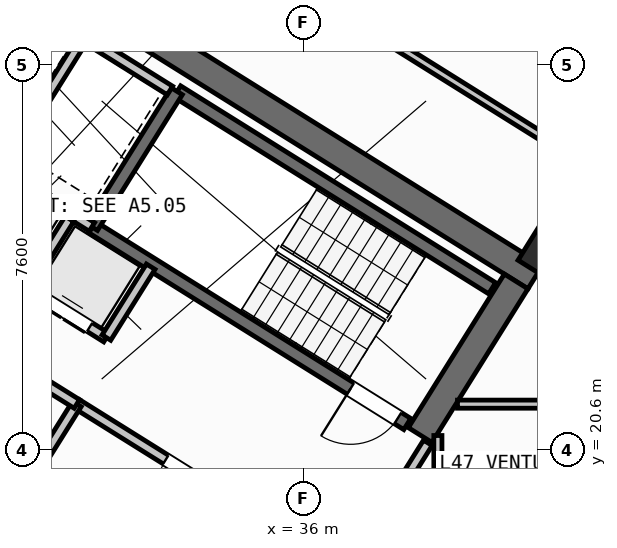
"""IFC4 building model, lengths in metres.
Left out: names, types, materials, properties, quantities, classifications, styles, units other than length and angle.
Written with IfcOpenShell. Run it as: python <this file> out.ifc"""

import sys

from ifc_helpers import new_model, si_unit, direction, frame, frame_2d, origin, origin_2d, place, context, subcontext, project, spatial, rectangle, hollow_rectangle, extrude, source, transform, mapped, element, fill, save


model = new_model("IFC4")
c1 = context("Model", 3, precision=1e-05, world=origin(), true_north=direction((0.0, 1.0)))
c2 = subcontext(c1, "Body", "Model", "MODEL_VIEW")
j1 = project(units=[si_unit("LENGTHUNIT", "METRE"), si_unit("PLANEANGLEUNIT", "RADIAN")], contexts=[c1])
p1 = place(None, origin())
s1 = spatial("IfcSite", under=j1, at=p1, CompositionType="ELEMENT")
p2 = place(p1, origin())
s2 = spatial("IfcBuilding", under=s1, at=p2, CompositionType="ELEMENT")
p3 = place(p2, frame((0.0, 0.0, 187.8)))
s3 = spatial("IfcBuildingStorey", under=s2, at=p3, CompositionType="ELEMENT", Elevation=187.8)
p4 = place(p3, frame((40.573, 24.01, 0.0), z_axis=(0.0, 0.0, 1.0), x_axis=(-0.848047359947, 0.529920442413, 0.0)))
e1 = element("IfcWall", 1, at=p4, inside=s3, PredefinedType="SHEAR", context=c2, shape_type="SweptSolid", body=[
    extrude(rectangle(XDim=13.14, YDim=0.55, at=frame_2d((6.57, 0.0))), origin(), (0.0, 0.0, 1.0), 3.35),
])
p5 = place(p3, frame((40.194, 23.922, 0.0), z_axis=(0.0, 0.0, 1.0), x_axis=(-0.529888438328, -0.848067357541, 0.0)))
e2 = element("IfcWall", 2, at=p5, inside=s3, PredefinedType="SHEAR", context=c2, shape_type="SweptSolid", body=[
    extrude(rectangle(XDim=3.575, YDim=0.55, at=frame_2d((1.788, 0.0))), origin(), (0.0, 0.0, 1.0), 3.35),
])
m1 = source(origin(), c2, "Body", "SweptSolid", [
    extrude(hollow_rectangle(XDim=0.8, YDim=0.8, WallThickness=0.032, at=origin_2d()), origin(), (0.0, 0.0, 1.0), 3.6),
])
p6 = place(p3, frame((40.783, 24.469, 0.0), z_axis=(0.0, 0.0, 1.0), x_axis=(-0.848048096156, 0.529919264233, 0.0)))
e3 = element("IfcColumn", 3, at=p6, inside=s3, PredefinedType="COLUMN", context=c2, shape_type="MappedRepresentation", body=[
    mapped(m1, transform((0.0, 0.0, 0.0), scale=1.0)),
])
p7 = place(p3, frame((31.76, 12.183, 0.0), z_axis=(0.0, 0.0, 1.0), x_axis=(-0.848047074256, 0.529920899612, 0.0)))
e4 = element("IfcWall", 4, at=p7, inside=s3, PredefinedType="STANDARD", context=c2, shape_type="SweptSolid", body=[
    extrude(rectangle(XDim=30.652, YDim=0.32, at=frame_2d((15.326, 0.0))), origin(), (0.0, 0.0, 1.0), 3.35),
])
p8 = place(p7, frame((15.166, 0.0, 0.0)))
e5 = element("IfcOpeningElement", 5, at=p8, cuts=e4, PredefinedType="OPENING", context=c2, shape_type="SweptSolid", body=[
    extrude(rectangle(XDim=1.2, YDim=2.15, at=frame_2d((0.6, 1.075))), frame((0.0, 0.17, 0.0), z_axis=(0.0, -1.0, 0.0), x_axis=(1.0, 0.0, 0.0)), (0.0, 0.0, 1.0), 0.34),
])
p9 = place(p7, frame((2.015, 0.0, 0.8)))
e6 = element("IfcOpeningElement", 6, at=p9, cuts=e4, PredefinedType="OPENING", context=c2, shape_type="SweptSolid", body=[
    extrude(rectangle(XDim=2.1, YDim=1.55, at=frame_2d((1.05, 0.775))), frame((0.0, 0.17, 0.0), z_axis=(0.0, -1.0, 0.0), x_axis=(1.0, 0.0, 0.0)), (0.0, 0.0, 1.0), 0.34),
])
p10 = place(p7, frame((7.244, 0.0, 0.8)))
e7 = element("IfcOpeningElement", 7, at=p10, cuts=e4, PredefinedType="OPENING", context=c2, shape_type="SweptSolid", body=[
    extrude(rectangle(XDim=2.1, YDim=1.55, at=frame_2d((1.05, 0.775))), frame((0.0, 0.17, 0.0), z_axis=(0.0, -1.0, 0.0), x_axis=(1.0, 0.0, 0.0)), (0.0, 0.0, 1.0), 0.34),
])
p11 = place(p7, frame((12.623, 0.0, 1.0)))
e8 = element("IfcOpeningElement", 8, at=p11, cuts=e4, PredefinedType="OPENING", context=c2, shape_type="SweptSolid", body=[
    extrude(rectangle(XDim=0.9, YDim=1.25, at=frame_2d((0.45, 0.625))), frame((0.0, 0.17, 0.0), z_axis=(0.0, -1.0, 0.0), x_axis=(1.0, 0.0, 0.0)), (0.0, 0.0, 1.0), 0.34),
])
p12 = place(p7, frame((19.565, 0.0, 0.95)))
e9 = element("IfcOpeningElement", 9, at=p12, cuts=e4, PredefinedType="OPENING", context=c2, shape_type="SweptSolid", body=[
    extrude(rectangle(XDim=1.2, YDim=1.4, at=frame_2d((0.6, 0.7))), frame((0.0, 0.17, 0.0), z_axis=(0.0, -1.0, 0.0), x_axis=(1.0, 0.0, 0.0)), (0.0, 0.0, 1.0), 0.34),
])
p13 = place(p7, frame((25.983, 0.0, 1.0)))
e10 = element("IfcOpeningElement", 10, at=p13, cuts=e4, PredefinedType="OPENING", context=c2, shape_type="SweptSolid", body=[
    extrude(rectangle(XDim=0.9, YDim=1.25, at=frame_2d((0.45, 0.625))), frame((0.0, 0.17, 0.0), z_axis=(0.0, -1.0, 0.0), x_axis=(1.0, 0.0, 0.0)), (0.0, 0.0, 1.0), 0.34),
])
p14 = place(p7, frame((28.433, 0.0, 1.0)))
e11 = element("IfcOpeningElement", 11, at=p14, cuts=e4, PredefinedType="OPENING", context=c2, shape_type="SweptSolid", body=[
    extrude(rectangle(XDim=0.9, YDim=1.25, at=frame_2d((0.45, 0.625))), frame((0.0, 0.17, 0.0), z_axis=(0.0, -1.0, 0.0), x_axis=(1.0, 0.0, 0.0)), (0.0, 0.0, 1.0), 0.34),
])
p15 = place(p3, frame((31.28, 18.261, 0.0), z_axis=(0.0, 0.0, 1.0), x_axis=(-0.848051618787, 0.529913626805, 0.0)))
e12 = element("IfcWall", 12, at=p15, inside=s3, PredefinedType="SHEAR", context=c2, shape_type="SweptSolid", body=[
    extrude(rectangle(XDim=7.46, YDim=0.26, at=frame_2d((3.73, 0.0))), origin(), (0.0, 0.0, 1.0), 3.35),
])
p16 = place(p15, frame((0.36, 0.0, 0.0)))
e13 = element("IfcOpeningElement", 13, at=p16, cuts=e12, PredefinedType="OPENING", context=c2, shape_type="SweptSolid", body=[
    extrude(rectangle(XDim=0.86, YDim=2.05, at=frame_2d((0.43, 1.025))), frame((0.0, 0.14, 0.0), z_axis=(0.0, -1.0, 0.0), x_axis=(1.0, 0.0, 0.0)), (0.0, 0.0, 1.0), 0.28),
])
p17 = place(p3, frame((39.721, 23.788, 0.0), z_axis=(0.0, 0.0, 1.0), x_axis=(-0.848054434086, 0.529909121291, 0.0)))
e14 = element("IfcWall", 14, at=p17, inside=s3, PredefinedType="SHEAR", context=c2, shape_type="SweptSolid", body=[
    extrude(rectangle(XDim=7.33, YDim=0.26, at=frame_2d((3.665, 0.0))), origin(), (0.0, 0.0, 1.0), 3.35),
])
p18 = place(p3, frame((38.046, 21.108, 0.0), z_axis=(0.0, 0.0, 1.0), x_axis=(-0.848054434086, 0.529909121291, 0.0)))
e15 = element("IfcWall", 15, at=p18, inside=s3, PredefinedType="SHEAR", context=c2, shape_type="SweptSolid", body=[
    extrude(rectangle(XDim=7.33, YDim=0.26, at=frame_2d((3.665, 0.0))), origin(), (0.0, 0.0, 1.0), 3.35),
])
p19 = place(p18, frame((0.22, 0.0, 0.0)))
e16 = element("IfcOpeningElement", 16, at=p19, cuts=e15, PredefinedType="OPENING", context=c2, shape_type="SweptSolid", body=[
    extrude(rectangle(XDim=1.1, YDim=2.1, at=frame_2d((0.55, 1.05))), frame((0.0, 0.14, 0.0), z_axis=(0.0, -1.0, 0.0), x_axis=(1.0, 0.0, 0.0)), (0.0, 0.0, 1.0), 0.28),
])
p20 = place(p3, frame((33.496, 27.677, 0.0), z_axis=(0.0, 0.0, 1.0), x_axis=(-0.529908658664, -0.84805472316, 0.0)))
e17 = element("IfcWall", 17, at=p20, inside=s3, PredefinedType="SHEAR", context=c2, shape_type="SweptSolid", body=[
    extrude(rectangle(XDim=3.16, YDim=0.26, at=frame_2d((1.58, 0.0))), origin(), (0.0, 0.0, 1.0), 3.35),
])
p21 = place(p3, frame((36.417, 18.447, 0.0), z_axis=(0.0, 0.0, 1.0), x_axis=(-0.848064879198, 0.529892404805, 0.0)))
e18 = element("IfcWall", 18, at=p21, inside=s3, PredefinedType="STANDARD", context=c2, shape_type="SweptSolid", body=[
    extrude(rectangle(XDim=5.768, YDim=0.2, at=frame_2d((2.884, 0.0))), origin(), (0.0, 0.0, 1.0), 3.34),
])
p22 = place(p21, frame((2.548, 0.0, 0.0)))
e19 = element("IfcOpeningElement", 19, at=p22, cuts=e18, PredefinedType="OPENING", context=c2, shape_type="SweptSolid", body=[
    extrude(rectangle(XDim=1.15, YDim=2.1, at=frame_2d((0.575, 1.05))), frame((0.0, 0.11, 0.0), z_axis=(0.0, -1.0, 0.0), x_axis=(1.0, 0.0, 0.0)), (0.0, 0.0, 1.0), 0.22),
])
p23 = place(p3, frame((31.822, 24.998, 0.0), z_axis=(0.0, 0.0, 1.0), x_axis=(-0.848036912365, 0.52993716162, 0.0)))
e20 = element("IfcWall", 20, at=p23, inside=s3, PredefinedType="STANDARD", context=c2, shape_type="SweptSolid", body=[
    extrude(rectangle(XDim=4.618, YDim=0.2, at=frame_2d((2.309, 0.0))), origin(), (0.0, 0.0, 1.0), 3.34),
])
p24 = place(p3, frame((32.108, 22.814, 0.0), z_axis=(0.0, 0.0, 1.0), x_axis=(-0.848042229521, 0.529928652696, 0.0)))
e21 = element("IfcWall", 21, at=p24, inside=s3, PredefinedType="STANDARD", context=c2, shape_type="SweptSolid", body=[
    extrude(rectangle(XDim=5.62, YDim=0.2, at=frame_2d((2.81, 0.0))), origin(), (0.0, 0.0, 1.0), 3.34),
])
p25 = place(p24, frame((0.39, 0.0, 0.0)))
e22 = element("IfcOpeningElement", 22, at=p25, cuts=e21, PredefinedType="OPENING", context=c2, shape_type="SweptSolid", body=[
    extrude(rectangle(XDim=1.1, YDim=2.15, at=frame_2d((0.55, 1.075))), frame((0.0, 0.11, 0.0), z_axis=(0.0, -1.0, 0.0), x_axis=(1.0, 0.0, 0.0)), (0.0, 0.0, 1.0), 0.22),
])
p26 = place(p24, frame((2.25, 0.0, 0.0)))
e23 = element("IfcOpeningElement", 23, at=p26, cuts=e21, PredefinedType="OPENING", context=c2, shape_type="SweptSolid", body=[
    extrude(rectangle(XDim=1.1, YDim=2.15, at=frame_2d((0.55, 1.075))), frame((0.0, 0.11, 0.0), z_axis=(0.0, -1.0, 0.0), x_axis=(1.0, 0.0, 0.0)), (0.0, 0.0, 1.0), 0.22),
])
p27 = place(p24, frame((4.11, 0.0, 0.0)))
e24 = element("IfcOpeningElement", 24, at=p27, cuts=e21, PredefinedType="OPENING", context=c2, shape_type="SweptSolid", body=[
    extrude(rectangle(XDim=1.1, YDim=2.15, at=frame_2d((0.55, 1.075))), frame((0.0, 0.11, 0.0), z_axis=(0.0, -1.0, 0.0), x_axis=(1.0, 0.0, 0.0)), (0.0, 0.0, 1.0), 0.22),
])
p28 = place(p3, frame((32.982, 24.213, 0.0), z_axis=(0.0, 0.0, 1.0), x_axis=(-0.529839334948, -0.84809803628, 0.0)))
e25 = element("IfcWall", 25, at=p28, inside=s3, PredefinedType="STANDARD", context=c2, shape_type="SweptSolid", body=[
    extrude(rectangle(XDim=1.65, YDim=0.2, at=frame_2d((0.825, 0.0))), origin(), (0.0, 0.0, 1.0), 3.34),
])
p29 = place(p3, frame((31.645, 28.716, 0.0), z_axis=(0.0, 0.0, 1.0), x_axis=(-0.52986693015, -0.848080795876, 0.0)))
e26 = element("IfcWall", 26, at=p29, inside=s3, PredefinedType="STANDARD", context=c2, shape_type="SweptSolid", body=[
    extrude(rectangle(XDim=2.66, YDim=0.2, at=frame_2d((1.33, 0.0))), origin(), (0.0, 0.0, 1.0), 3.34),
])
p30 = place(p3, frame((33.363, 27.69, 0.0), z_axis=(0.0, 0.0, 1.0), x_axis=(-0.848047090064, 0.529920874315, 0.0)))
e27 = element("IfcWall", 27, at=p30, inside=s3, PredefinedType="STANDARD", context=c2, shape_type="SweptSolid", body=[
    extrude(rectangle(XDim=4.498, YDim=0.2, at=frame_2d((2.249, 0.0))), origin(), (0.0, 0.0, 1.0), 3.34),
])
p31 = place(p3, frame((31.379, 25.156, 0.0), z_axis=(0.0, 0.0, 1.0), x_axis=(-0.529998940003, -0.847998304005, 0.0)))
e28 = element("IfcWall", 28, at=p31, inside=s3, PredefinedType="STANDARD", context=c2, shape_type="SweptSolid", body=[
    extrude(rectangle(XDim=1.58, YDim=0.2, at=frame_2d((0.79, 0.0))), origin(), (0.0, 0.0, 1.0), 3.34),
])
p32 = place(p3, frame((31.525, 21.504, 0.0), z_axis=(0.0, 0.0, 1.0), x_axis=(-0.529907497854, -0.848055448493, 0.0)))
e29 = element("IfcWall", 29, at=p32, inside=s3, PredefinedType="STANDARD", context=c2, shape_type="SweptSolid", body=[
    extrude(rectangle(XDim=2.88, YDim=0.2, at=frame_2d((1.44, 0.0))), origin(), (0.0, 0.0, 1.0), 3.34),
])
p33 = place(p3, frame((31.525, 21.504, 0.0), z_axis=(0.0, 0.0, 1.0), x_axis=(-0.848040211232, 0.529931882541, 0.0)))
e30 = element("IfcWall", 30, at=p33, inside=s3, PredefinedType="STANDARD", context=c2, shape_type="SweptSolid", body=[
    extrude(rectangle(XDim=6.218, YDim=0.2, at=frame_2d((3.109, 0.0))), origin(), (0.0, 0.0, 1.0), 3.34),
])
p34 = place(p33, frame((4.4, 0.0, 0.0)))
e31 = element("IfcOpeningElement", 31, at=p34, cuts=e30, PredefinedType="OPENING", context=c2, shape_type="SweptSolid", body=[
    extrude(rectangle(XDim=0.86, YDim=2.05, at=frame_2d((0.43, 1.025))), frame((0.0, 0.11, 0.0), z_axis=(0.0, -1.0, 0.0), x_axis=(1.0, 0.0, 0.0)), (0.0, 0.0, 1.0), 0.22),
])
p35 = place(p33, frame((1.45, 0.0, 0.0)))
e32 = element("IfcOpeningElement", 32, at=p35, cuts=e30, PredefinedType="OPENING", context=c2, shape_type="SweptSolid", body=[
    extrude(rectangle(XDim=0.86, YDim=2.05, at=frame_2d((0.43, 1.025))), frame((0.0, 0.11, 0.0), z_axis=(0.0, -1.0, 0.0), x_axis=(1.0, 0.0, 0.0)), (0.0, 0.0, 1.0), 0.22),
])
p36 = place(p3, frame((41.936, 26.012, 0.0), z_axis=(0.0, 0.0, 1.0), x_axis=(-0.848051154596, 0.529914369676, 0.0)))
e33 = element("IfcWall", 33, at=p36, inside=s3, PredefinedType="PARTITIONING", context=c2, shape_type="SweptSolid", body=[
    extrude(rectangle(XDim=15.57, YDim=0.16, at=frame_2d((7.785, 0.0))), origin(), (0.0, 0.0, 1.0), 3.34),
])
p37 = place(p36, frame((10.83, 0.0, 0.0)))
e34 = element("IfcOpeningElement", 34, at=p37, cuts=e33, PredefinedType="OPENING", context=c2, shape_type="SweptSolid", body=[
    extrude(rectangle(XDim=1.0, YDim=2.1, at=frame_2d((0.5, 1.05))), frame((0.0, 0.09, 0.0), z_axis=(0.0, -1.0, 0.0), x_axis=(1.0, 0.0, 0.0)), (0.0, 0.0, 1.0), 0.18),
])
p38 = place(p3, frame((38.451, 20.737, 0.0), z_axis=(0.0, 0.0, 1.0), x_axis=(-0.529924799939, -0.848044637038, 0.0)))
e35 = element("IfcWall", 35, at=p38, inside=s3, PredefinedType="STANDARD", context=c2, shape_type="SweptSolid", body=[
    extrude(rectangle(XDim=2.96, YDim=0.2, at=frame_2d((1.48, 0.0))), origin(), (0.0, 0.0, 1.0), 3.34),
])
p39 = place(p38, frame((1.46, 0.0, 0.0)))
e36 = element("IfcOpeningElement", 36, at=p39, cuts=e35, PredefinedType="OPENING", context=c2, shape_type="SweptSolid", body=[
    extrude(rectangle(XDim=0.86, YDim=2.05, at=frame_2d((0.43, 1.025))), frame((0.0, 0.11, 0.0), z_axis=(0.0, -1.0, 0.0), x_axis=(1.0, 0.0, 0.0)), (0.0, 0.0, 1.0), 0.22),
])
p40 = place(p3, frame((38.65, 17.93, 0.0), z_axis=(0.0, 0.0, 1.0), x_axis=(0.0, 1.0, 0.0)))
e37 = element("IfcWall", 37, at=p40, inside=s3, PredefinedType="PARTITIONING", context=c2, shape_type="SweptSolid", body=[
    extrude(rectangle(XDim=2.951, YDim=0.16, at=frame_2d((1.476, 0.0))), origin(), (0.0, 0.0, 1.0), 3.34),
])
p41 = place(p3, frame((39.037, 21.5, 0.0), z_axis=(0.0, 0.0, 1.0), x_axis=(1.0, 0.0, 0.0)))
e38 = element("IfcWall", 38, at=p41, inside=s3, PredefinedType="PARTITIONING", context=c2, shape_type="SweptSolid", body=[
    extrude(rectangle(XDim=7.215, YDim=0.16, at=frame_2d((3.607, 0.0))), origin(), (0.0, 0.0, 1.0), 3.34),
])
m2 = source(origin(), c2, "Body", "SweptSolid", [
    extrude(rectangle(XDim=1.1, YDim=2.1, at=frame_2d((0.55, 1.05))), frame((0.0, 0.025, 0.0), z_axis=(0.0, -1.0, 0.0), x_axis=(1.0, 0.0, 0.0)), (0.0, 0.0, 1.0), 0.05),
])
p42 = place(p19, origin())
e39 = element("IfcDoor", 39, at=p42, inside=s3, OperationType="SINGLE_SWING_RIGHT", PredefinedType="DOOR", context=c2, shape_type="MappedRepresentation", body=[
    mapped(m2, transform((0.0, 0.0, 0.0), scale=1.0)),
])
fill(e16, e39)
m3 = source(origin(), c2, "Body", "SweptSolid", [
    extrude(rectangle(XDim=1.15, YDim=2.1, at=frame_2d((0.575, 1.05))), frame((0.0, 0.025, 0.0), z_axis=(0.0, -1.0, 0.0), x_axis=(1.0, 0.0, 0.0)), (0.0, 0.0, 1.0), 0.05),
])
p43 = place(p22, origin())
e40 = element("IfcDoor", 40, at=p43, inside=s3, OperationType="SINGLE_SWING_LEFT", PredefinedType="DOOR", context=c2, shape_type="MappedRepresentation", body=[
    mapped(m3, transform((0.0, 0.0, 0.0), scale=1.0)),
])
fill(e19, e40)
m4 = source(origin(), c2, "Body", "SweptSolid", [
    extrude(rectangle(XDim=1.1, YDim=2.15, at=frame_2d((0.55, 1.075))), frame((0.0, 0.025, 0.0), z_axis=(0.0, -1.0, 0.0), x_axis=(1.0, 0.0, 0.0)), (0.0, 0.0, 1.0), 0.05),
])
p44 = place(p25, origin())
e41 = element("IfcDoor", 41, at=p44, inside=s3, OperationType="DOUBLE_DOOR_SLIDING", PredefinedType="DOOR", context=c2, shape_type="MappedRepresentation", body=[
    mapped(m4, transform((0.0, 0.0, 0.0), scale=1.0)),
])
fill(e22, e41)
save(model, sys.argv[1])
